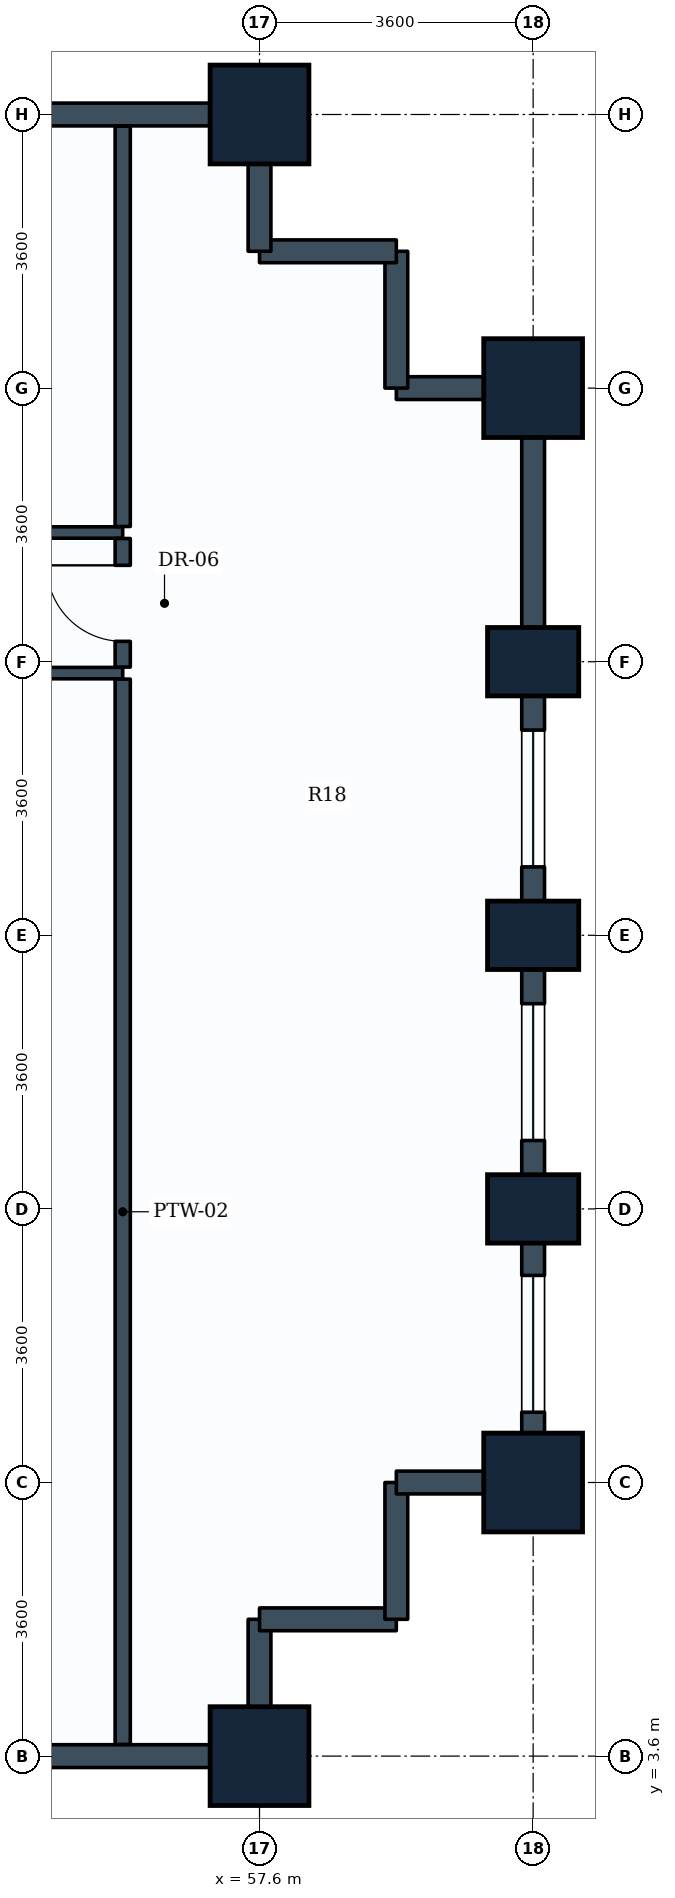
"""IFC4 building model, lengths in metres.
Left out: names, types, materials, properties, quantities, classifications, styles, units other than length and angle.
Written with IfcOpenShell. Run it as: python <this file> out.ifc"""

import sys

from ifc_helpers import new_model, si_unit, direction, frame, frame_2d, origin, origin_2d, place, context, subcontext, project, spatial, rectangle, extrude, element, fill, save


model = new_model("IFC4")
c1 = context("Model", 3, precision=1e-05, world=origin(), true_north=direction((0.0, 1.0)))
c2 = subcontext(c1, "Body", "Model", "MODEL_VIEW")
j1 = project(units=[si_unit("LENGTHUNIT", "METRE"), si_unit("PLANEANGLEUNIT", "RADIAN")], contexts=[c1])
p1 = place(None, origin())
s1 = spatial("IfcSite", under=j1, at=p1, CompositionType="ELEMENT")
p2 = place(p1, origin())
s2 = spatial("IfcBuilding", under=s1, at=p2, CompositionType="ELEMENT")
p3 = place(p2, frame((0.0, 0.0, 55.2)))
s3 = spatial("IfcBuildingStorey", under=s2, at=p3, CompositionType="ELEMENT", Elevation=55.2)
for number, where, z_axis, x_axis in (
    (1, (57.6, 3.6, 0.0), (0.0, 0.0, 1.0), (1.0, 0.0, 0.0)),
    (2, (57.6, 25.2, 0.0), (0.0, 0.0, 1.0), (1.0, 0.0, 0.0)),
    (3, (61.2, 7.2, 0.0), (0.0, 0.0, 1.0), (1.0, 0.0, 0.0)),
):
    element("IfcColumn", number, at=place(p3, frame(where, z_axis=z_axis, x_axis=x_axis)), inside=s3, PredefinedType="COLUMN", context=c2, shape_type="SweptSolid", body=[
        extrude(rectangle(XDim=1.3, YDim=1.3, at=origin_2d()), origin(), (0.0, 0.0, 1.0), 3.9),
    ])
for number, where, z_axis, x_axis in (
    (4, (61.2, 10.8, 0.0), (0.0, 0.0, 1.0), (0.0, 1.0, 0.0)),
    (5, (61.2, 14.4, 0.0), (0.0, 0.0, 1.0), (0.0, 1.0, 0.0)),
    (6, (61.2, 18.0, 0.0), (0.0, 0.0, 1.0), (0.0, 1.0, 0.0)),
):
    element("IfcColumn", number, at=place(p3, frame(where, z_axis=z_axis, x_axis=x_axis)), inside=s3, PredefinedType="COLUMN", context=c2, shape_type="SweptSolid", body=[
        extrude(rectangle(XDim=0.9, YDim=1.2, at=origin_2d()), origin(), (0.0, 0.0, 1.0), 3.9),
    ])
p4 = place(p3, frame((61.2, 21.6, 0.0), z_axis=(0.0, 0.0, 1.0), x_axis=(0.0, 1.0, 0.0)))
e7 = element("IfcColumn", 7, at=p4, inside=s3, PredefinedType="COLUMN", context=c2, shape_type="SweptSolid", body=[
    extrude(rectangle(XDim=1.3, YDim=1.3, at=origin_2d()), origin(), (0.0, 0.0, 1.0), 3.9),
])
p5 = place(p3, frame((57.6, 3.6, 0.0), z_axis=(0.0, 0.0, 1.0), x_axis=(-1.0, 0.0, 0.0)))
e8 = element("IfcWall", 8, at=p5, inside=s3, PredefinedType="STANDARD", context=c2, shape_type="SweptSolid", body=[
    extrude(rectangle(XDim=3.6, YDim=0.3, at=frame_2d((1.8, 0.0))), origin(), (0.0, 0.0, 1.0), 2.93),
])
p6 = place(p3, frame((57.6, 5.4, 0.0), z_axis=(0.0, 0.0, 1.0), x_axis=(0.0, -1.0, 0.0)))
e9 = element("IfcWall", 9, at=p6, inside=s3, PredefinedType="STANDARD", context=c2, shape_type="SweptSolid", body=[
    extrude(rectangle(XDim=1.8, YDim=0.3, at=frame_2d((0.9, 0.0))), origin(), (0.0, 0.0, 1.0), 2.93),
])
p7 = place(p3, frame((59.4, 5.4, 0.0), z_axis=(0.0, 0.0, 1.0), x_axis=(-1.0, 0.0, 0.0)))
e10 = element("IfcWall", 10, at=p7, inside=s3, PredefinedType="STANDARD", context=c2, shape_type="SweptSolid", body=[
    extrude(rectangle(XDim=1.8, YDim=0.3, at=frame_2d((0.9, 0.0))), origin(), (0.0, 0.0, 1.0), 3.635),
])
p8 = place(p3, frame((59.4, 7.2, 0.0), z_axis=(0.0, 0.0, 1.0), x_axis=(0.0, -1.0, 0.0)))
e11 = element("IfcWall", 11, at=p8, inside=s3, PredefinedType="STANDARD", context=c2, shape_type="SweptSolid", body=[
    extrude(rectangle(XDim=1.8, YDim=0.3, at=frame_2d((0.9, 0.0))), origin(), (0.0, 0.0, 1.0), 3.635),
])
p9 = place(p3, frame((61.2, 7.2, 0.0), z_axis=(0.0, 0.0, 1.0), x_axis=(-1.0, 0.0, 0.0)))
e12 = element("IfcWall", 12, at=p9, inside=s3, PredefinedType="STANDARD", context=c2, shape_type="SweptSolid", body=[
    extrude(rectangle(XDim=1.8, YDim=0.3, at=frame_2d((0.9, 0.0))), origin(), (0.0, 0.0, 1.0), 2.93),
])
p10 = place(p3, frame((61.2, 10.8, 0.0), z_axis=(0.0, 0.0, 1.0), x_axis=(0.0, -1.0, 0.0)))
e13 = element("IfcWall", 13, at=p10, inside=s3, PredefinedType="STANDARD", context=c2, shape_type="SweptSolid", body=[
    extrude(rectangle(XDim=3.6, YDim=0.3, at=frame_2d((1.8, 0.0))), origin(), (0.0, 0.0, 1.0), 2.93),
])
p11 = place(p10, frame((0.875, 0.0, 0.85)))
e14 = element("IfcOpeningElement", 14, at=p11, cuts=e13, PredefinedType="OPENING", context=c2, shape_type="SweptSolid", body=[
    extrude(rectangle(XDim=1.8, YDim=1.35, at=frame_2d((0.9, 0.675))), frame((0.0, 0.16, 0.0), z_axis=(0.0, -1.0, 0.0), x_axis=(1.0, 0.0, 0.0)), (0.0, 0.0, 1.0), 0.32),
])
p12 = place(p3, frame((61.2, 14.4, 0.0), z_axis=(0.0, 0.0, 1.0), x_axis=(0.0, -1.0, 0.0)))
e15 = element("IfcWall", 15, at=p12, inside=s3, PredefinedType="STANDARD", context=c2, shape_type="SweptSolid", body=[
    extrude(rectangle(XDim=3.6, YDim=0.3, at=frame_2d((1.8, 0.0))), origin(), (0.0, 0.0, 1.0), 2.93),
])
p13 = place(p12, frame((0.9, 0.0, 0.85)))
e16 = element("IfcOpeningElement", 16, at=p13, cuts=e15, PredefinedType="OPENING", context=c2, shape_type="SweptSolid", body=[
    extrude(rectangle(XDim=1.8, YDim=1.35, at=frame_2d((0.9, 0.675))), frame((0.0, 0.16, 0.0), z_axis=(0.0, -1.0, 0.0), x_axis=(1.0, 0.0, 0.0)), (0.0, 0.0, 1.0), 0.32),
])
p14 = place(p3, frame((61.2, 18.0, 0.0), z_axis=(0.0, 0.0, 1.0), x_axis=(0.0, -1.0, 0.0)))
e17 = element("IfcWall", 17, at=p14, inside=s3, PredefinedType="STANDARD", context=c2, shape_type="SweptSolid", body=[
    extrude(rectangle(XDim=3.6, YDim=0.3, at=frame_2d((1.8, 0.0))), origin(), (0.0, 0.0, 1.0), 2.93),
])
p15 = place(p14, frame((0.9, 0.0, 0.85)))
e18 = element("IfcOpeningElement", 18, at=p15, cuts=e17, PredefinedType="OPENING", context=c2, shape_type="SweptSolid", body=[
    extrude(rectangle(XDim=1.8, YDim=1.35, at=frame_2d((0.9, 0.675))), frame((0.0, 0.16, 0.0), z_axis=(0.0, -1.0, 0.0), x_axis=(1.0, 0.0, 0.0)), (0.0, 0.0, 1.0), 0.32),
])
p16 = place(p3, frame((61.2, 21.6, 0.0), z_axis=(0.0, 0.0, 1.0), x_axis=(0.0, -1.0, 0.0)))
e19 = element("IfcWall", 19, at=p16, inside=s3, PredefinedType="STANDARD", context=c2, shape_type="SweptSolid", body=[
    extrude(rectangle(XDim=3.6, YDim=0.3, at=frame_2d((1.8, 0.0))), origin(), (0.0, 0.0, 1.0), 2.93),
])
p17 = place(p3, frame((61.2, 21.6, 0.0), z_axis=(0.0, 0.0, 1.0), x_axis=(-1.0, 0.0, 0.0)))
e20 = element("IfcWall", 20, at=p17, inside=s3, PredefinedType="STANDARD", context=c2, shape_type="SweptSolid", body=[
    extrude(rectangle(XDim=1.8, YDim=0.3, at=frame_2d((0.9, 0.0))), origin(), (0.0, 0.0, 1.0), 2.93),
])
for number, where, z_axis, x_axis in (
    (21, (59.4, 23.4, 0.0), (0.0, 0.0, 1.0), (0.0, -1.0, 0.0)),
    (22, (57.6, 23.4, 0.0), (0.0, 0.0, 1.0), (1.0, 0.0, 0.0)),
):
    element("IfcWall", number, at=place(p3, frame(where, z_axis=z_axis, x_axis=x_axis)), inside=s3, PredefinedType="STANDARD", context=c2, shape_type="SweptSolid", body=[
        extrude(rectangle(XDim=1.8, YDim=0.3, at=frame_2d((0.9, 0.0))), origin(), (0.0, 0.0, 1.0), 3.635),
    ])
p18 = place(p3, frame((57.6, 25.2, 0.0), z_axis=(0.0, 0.0, 1.0), x_axis=(0.0, -1.0, 0.0)))
e23 = element("IfcWall", 23, at=p18, inside=s3, PredefinedType="STANDARD", context=c2, shape_type="SweptSolid", body=[
    extrude(rectangle(XDim=1.8, YDim=0.3, at=frame_2d((0.9, 0.0))), origin(), (0.0, 0.0, 1.0), 2.93),
])
p19 = place(p3, frame((54.0, 25.2, 0.0), z_axis=(0.0, 0.0, 1.0), x_axis=(1.0, 0.0, 0.0)))
e24 = element("IfcWall", 24, at=p19, inside=s3, PredefinedType="STANDARD", context=c2, shape_type="SweptSolid", body=[
    extrude(rectangle(XDim=3.6, YDim=0.3, at=frame_2d((1.8, 0.0))), origin(), (0.0, 0.0, 1.0), 2.93),
])
p20 = place(p3, frame((48.629, 17.85, 0.0), z_axis=(0.0, 0.0, 1.0), x_axis=(1.0, 0.0, 0.0)))
e25 = element("IfcWall", 25, at=p20, inside=s3, PredefinedType="PARTITIONING", context=c2, shape_type="SweptSolid", body=[
    extrude(rectangle(XDim=7.171, YDim=0.15, at=frame_2d((3.585, 0.0))), origin(), (0.0, 0.0, 1.0), 3.04),
])
p21 = place(p20, frame((3.046, 0.0, 0.0)))
e26 = element("IfcOpeningElement", 26, at=p21, cuts=e25, PredefinedType="OPENING", context=c2, shape_type="SweptSolid", body=[
    extrude(rectangle(XDim=1.0, YDim=2.1, at=frame_2d((0.5, 1.05))), frame((0.0, 0.085, 0.0), z_axis=(0.0, -1.0, 0.0), x_axis=(1.0, 0.0, 0.0)), (0.0, 0.0, 1.0), 0.17),
])
p22 = place(p3, frame((47.479, 19.7, 0.0), z_axis=(0.0, 0.0, 1.0), x_axis=(1.0, 0.0, 0.0)))
e27 = element("IfcWall", 27, at=p22, inside=s3, PredefinedType="PARTITIONING", context=c2, shape_type="SweptSolid", body=[
    extrude(rectangle(XDim=8.321, YDim=0.15, at=frame_2d((4.161, 0.0))), origin(), (0.0, 0.0, 1.0), 3.04),
])
p23 = place(p22, frame((3.621, 0.0, 0.0)))
e28 = element("IfcOpeningElement", 28, at=p23, cuts=e27, PredefinedType="OPENING", context=c2, shape_type="SweptSolid", body=[
    extrude(rectangle(XDim=1.0, YDim=2.1, at=frame_2d((0.5, 1.05))), frame((0.0, 0.085, 0.0), z_axis=(0.0, -1.0, 0.0), x_axis=(1.0, 0.0, 0.0)), (0.0, 0.0, 1.0), 0.17),
])
p24 = place(p3, frame((55.8, 3.754, 0.0), z_axis=(0.0, 0.0, 1.0), x_axis=(0.0, 1.0, 0.0)))
e29 = element("IfcWall", 29, at=p24, inside=s3, PredefinedType="PARTITIONING", context=c2, shape_type="SweptSolid", body=[
    extrude(rectangle(XDim=14.017, YDim=0.2, at=frame_2d((7.009, 0.0))), origin(), (0.0, 0.0, 1.0), 2.93),
])
p25 = place(p3, frame((55.8, 19.779, 0.0), z_axis=(0.0, 0.0, 1.0), x_axis=(0.0, 1.0, 0.0)))
e30 = element("IfcWall", 30, at=p25, inside=s3, PredefinedType="PARTITIONING", context=c2, shape_type="SweptSolid", body=[
    extrude(rectangle(XDim=5.267, YDim=0.2, at=frame_2d((2.633, 0.0))), origin(), (0.0, 0.0, 1.0), 2.93),
])
p26 = place(p3, frame((55.8, 17.929, 0.0), z_axis=(0.0, 0.0, 1.0), x_axis=(0.0, 1.0, 0.0)))
e31 = element("IfcWall", 31, at=p26, inside=s3, PredefinedType="PARTITIONING", context=c2, shape_type="SweptSolid", body=[
    extrude(rectangle(XDim=1.692, YDim=0.2, at=frame_2d((0.846, 0.0))), origin(), (0.0, 0.0, 1.0), 3.635),
])
p27 = place(p26, frame((0.339, 0.0, 0.0)))
e32 = element("IfcOpeningElement", 32, at=p27, cuts=e31, PredefinedType="OPENING", context=c2, shape_type="SweptSolid", body=[
    extrude(rectangle(XDim=1.0, YDim=2.1, at=frame_2d((0.5, 1.05))), frame((0.0, 0.11, 0.0), z_axis=(0.0, -1.0, 0.0), x_axis=(1.0, 0.0, 0.0)), (0.0, 0.0, 1.0), 0.22),
])
p28 = place(p11, origin())
e33 = element("IfcWindow", 33, at=p28, inside=s3, PartitioningType="SINGLE_PANEL", PredefinedType="WINDOW", context=c2, shape_type="SweptSolid", body=[
    extrude(rectangle(XDim=1.8, YDim=1.35, at=frame_2d((0.9, 0.675))), frame((0.0, 0.03, 0.0), z_axis=(0.0, -1.0, 0.0), x_axis=(1.0, 0.0, 0.0)), (0.0, 0.0, 1.0), 0.06),
])
fill(e14, e33)
p29 = place(p13, origin())
e34 = element("IfcWindow", 34, at=p29, inside=s3, PartitioningType="SINGLE_PANEL", PredefinedType="WINDOW", context=c2, shape_type="SweptSolid", body=[
    extrude(rectangle(XDim=1.8, YDim=1.35, at=frame_2d((0.9, 0.675))), frame((0.0, 0.03, 0.0), z_axis=(0.0, -1.0, 0.0), x_axis=(1.0, 0.0, 0.0)), (0.0, 0.0, 1.0), 0.06),
])
fill(e16, e34)
p30 = place(p15, origin())
e35 = element("IfcWindow", 35, at=p30, inside=s3, PartitioningType="SINGLE_PANEL", PredefinedType="WINDOW", context=c2, shape_type="SweptSolid", body=[
    extrude(rectangle(XDim=1.8, YDim=1.35, at=frame_2d((0.9, 0.675))), frame((0.0, 0.03, 0.0), z_axis=(0.0, -1.0, 0.0), x_axis=(1.0, 0.0, 0.0)), (0.0, 0.0, 1.0), 0.06),
])
fill(e18, e35)
p31 = place(p27, origin())
e36 = element("IfcDoor", 36, at=p31, inside=s3, OperationType="SINGLE_SWING_RIGHT", PredefinedType="DOOR", context=c2, shape_type="SweptSolid", body=[
    extrude(rectangle(XDim=1.0, YDim=2.1, at=frame_2d((0.5, 1.05))), frame((0.0, 0.025, 0.0), z_axis=(0.0, -1.0, 0.0), x_axis=(1.0, 0.0, 0.0)), (0.0, 0.0, 1.0), 0.05),
])
fill(e32, e36)
save(model, sys.argv[1])
